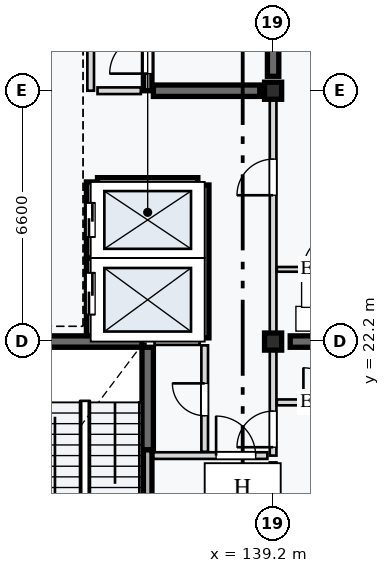
"""IFC4 building model, lengths in metres.
Left out: names, types, materials, properties, quantities, classifications, styles, units other than length and angle.
Written with IfcOpenShell. Run it as: python <this file> out.ifc"""

import sys

from ifc_helpers import new_model, si_unit, direction, frame, frame_2d, origin, origin_2d, place, context, subcontext, project, spatial, rectangle, extrude, element, fill, save


model = new_model("IFC4")
c1 = context("Model", 3, precision=1e-05, world=origin(), true_north=direction((0.0, 1.0)))
c2 = subcontext(c1, "Body", "Model", "MODEL_VIEW")
j1 = project(units=[si_unit("LENGTHUNIT", "METRE"), si_unit("PLANEANGLEUNIT", "RADIAN")], contexts=[c1])
p1 = place(None, origin())
s1 = spatial("IfcSite", under=j1, at=p1, CompositionType="ELEMENT")
p2 = place(p1, origin())
s2 = spatial("IfcBuilding", under=s1, at=p2, CompositionType="ELEMENT")
p3 = place(p2, frame((0.0, 0.0, 27.6)))
s3 = spatial("IfcBuildingStorey", under=s2, at=p3, CompositionType="ELEMENT", Elevation=27.6)
for number, where, z_axis, x_axis in (
    (1, (139.2, 22.2, 0.0), (0.0, 0.0, 1.0), (1.0, 0.0, 0.0)),
    (2, (139.2, 28.8, 0.0), (0.0, 0.0, 1.0), (1.0, 0.0, 0.0)),
):
    element("IfcColumn", number, at=place(p3, frame(where, z_axis=z_axis, x_axis=x_axis)), inside=s3, PredefinedType="COLUMN", context=c2, shape_type="SweptSolid", body=[
        extrude(rectangle(XDim=0.45, YDim=0.45, at=origin_2d()), origin(), (0.0, 0.0, 1.0), 3.2),
    ])
p4 = place(p3, frame((135.9, 19.35, 0.0), z_axis=(0.0, 0.0, 1.0), x_axis=(0.0, 1.0, 0.0)))
e3 = element("IfcWall", 3, at=p4, inside=s3, PredefinedType="SHEAR", context=c2, shape_type="SweptSolid", body=[
    extrude(rectangle(XDim=2.7, YDim=0.3, at=frame_2d((1.35, 0.0))), origin(), (0.0, 0.0, 1.0), 2.97),
])
p5 = place(p3, frame((132.95, 22.2, 0.0), z_axis=(0.0, 0.0, 1.0), x_axis=(1.0, 0.0, 0.0)))
e4 = element("IfcWall", 4, at=p5, inside=s3, PredefinedType="SHEAR", context=c2, shape_type="SweptSolid", body=[
    extrude(rectangle(XDim=2.8, YDim=0.3, at=frame_2d((1.4, 0.0))), origin(), (0.0, 0.0, 1.0), 2.97),
])
p6 = place(p3, frame((139.2, 29.18, 0.0), z_axis=(0.0, 0.0, 1.0), x_axis=(0.0, 1.0, 0.0)))
e5 = element("IfcWall", 5, at=p6, inside=s3, PredefinedType="SHEAR", context=c2, shape_type="SweptSolid", body=[
    extrude(rectangle(XDim=5.84, YDim=0.3, at=frame_2d((2.92, 0.0))), origin(), (0.0, 0.0, 1.0), 2.97),
])
p7 = place(p3, frame((136.05, 28.8, 0.0), z_axis=(0.0, 0.0, 1.0), x_axis=(1.0, 0.0, 0.0)))
e6 = element("IfcWall", 6, at=p7, inside=s3, PredefinedType="SHEAR", context=c2, shape_type="SweptSolid", body=[
    extrude(rectangle(XDim=2.8, YDim=0.3, at=frame_2d((1.4, 0.0))), origin(), (0.0, 0.0, 1.0), 2.97),
])
p8 = place(p3, frame((139.65, 22.2, 0.0), z_axis=(0.0, 0.0, 1.0), x_axis=(1.0, 0.0, 0.0)))
e7 = element("IfcWall", 7, at=p8, inside=s3, PredefinedType="SHEAR", context=c2, shape_type="SweptSolid", body=[
    extrude(rectangle(XDim=5.7, YDim=0.3, at=frame_2d((2.85, 0.0))), origin(), (0.0, 0.0, 1.0), 2.97),
])
p9 = place(p3, frame((135.9, 15.75, 0.0), z_axis=(0.0, 0.0, 1.0), x_axis=(0.0, 1.0, 0.0)))
e8 = element("IfcWall", 8, at=p9, inside=s3, PredefinedType="STANDARD", context=c2, shape_type="SweptSolid", body=[
    extrude(rectangle(XDim=3.6, YDim=0.225, at=frame_2d((1.8, 0.0))), origin(), (0.0, 0.0, 1.0), 2.97),
])
p10 = place(p9, frame((0.45, 0.0, 0.0)))
e9 = element("IfcOpeningElement", 9, at=p10, cuts=e8, PredefinedType="OPENING", context=c2, shape_type="SweptSolid", body=[
    extrude(rectangle(XDim=1.0, YDim=2.16, at=frame_2d((0.5, 1.08))), frame((0.0, 0.123, 0.0), z_axis=(0.0, -1.0, 0.0), x_axis=(1.0, 0.0, 0.0)), (0.0, 0.0, 1.0), 0.245),
])
p11 = place(p3, frame((136.05, 19.2, 0.0), z_axis=(0.0, 0.0, 1.0), x_axis=(1.0, 0.0, 0.0)))
e10 = element("IfcWall", 10, at=p11, inside=s3, PredefinedType="PARTITIONING", context=c2, shape_type="SweptSolid", body=[
    extrude(rectangle(XDim=3.0, YDim=0.175, at=frame_2d((1.5, 0.0))), origin(), (0.0, 0.0, 1.0), 2.97),
])
p12 = place(p11, frame((1.65, 0.0, 0.0)))
e11 = element("IfcOpeningElement", 11, at=p12, cuts=e10, PredefinedType="OPENING", context=c2, shape_type="SweptSolid", body=[
    extrude(rectangle(XDim=1.04, YDim=2.12, at=frame_2d((0.52, 1.06))), frame((0.0, 0.097, 0.0), z_axis=(0.0, -1.0, 0.0), x_axis=(1.0, 0.0, 0.0)), (0.0, 0.0, 1.0), 0.195),
])
p13 = place(p3, frame((137.4, 19.3, 0.0), z_axis=(0.0, 0.0, 1.0), x_axis=(0.0, 1.0, 0.0)))
e12 = element("IfcWall", 12, at=p13, inside=s3, PredefinedType="PARTITIONING", context=c2, shape_type="SweptSolid", body=[
    extrude(rectangle(XDim=2.8, YDim=0.175, at=frame_2d((1.4, 0.0))), origin(), (0.0, 0.0, 1.0), 2.97),
])
p14 = place(p13, frame((0.95, 0.0, 0.0)))
e13 = element("IfcOpeningElement", 13, at=p14, cuts=e12, PredefinedType="OPENING", context=c2, shape_type="SweptSolid", body=[
    extrude(rectangle(XDim=0.85, YDim=2.0, at=frame_2d((0.425, 1.0))), frame((0.0, 0.097, 0.0), z_axis=(0.0, -1.0, 0.0), x_axis=(1.0, 0.0, 0.0)), (0.0, 0.0, 1.0), 0.195),
])
p15 = place(p3, frame((136.08, 22.2, 0.0), z_axis=(0.0, 0.0, 1.0), x_axis=(1.0, 0.0, 0.0)))
e14 = element("IfcWall", 14, at=p15, inside=s3, PredefinedType="PARTITIONING", context=c2, shape_type="SweptSolid", body=[
    extrude(rectangle(XDim=1.19, YDim=0.175, at=frame_2d((0.595, 0.0))), origin(), (0.0, 0.0, 1.0), 2.97),
])
p16 = place(p3, frame((134.4, 22.36, 0.0), z_axis=(0.0, 0.0, 1.0), x_axis=(0.0, 1.0, 0.0)))
e15 = element("IfcWall", 15, at=p16, inside=s3, PredefinedType="STANDARD", context=c2, shape_type="SweptSolid", body=[
    extrude(rectangle(XDim=2.04, YDim=0.225, at=frame_2d((1.02, 0.0))), origin(), (0.0, 0.0, 1.0), 2.97),
])
p17 = place(p16, frame((0.55, 0.0, 0.0)))
e16 = element("IfcOpeningElement", 16, at=p17, cuts=e15, PredefinedType="OPENING", context=c2, shape_type="SweptSolid", body=[
    extrude(rectangle(XDim=1.1, YDim=2.1, at=frame_2d((0.55, 1.05))), frame((0.0, 0.123, 0.0), z_axis=(0.0, -1.0, 0.0), x_axis=(1.0, 0.0, 0.0)), (0.0, 0.0, 1.0), 0.245),
])
p18 = place(p3, frame((134.4, 24.4, 0.0), z_axis=(0.0, 0.0, 1.0), x_axis=(0.0, 1.0, 0.0)))
e17 = element("IfcWall", 17, at=p18, inside=s3, PredefinedType="STANDARD", context=c2, shape_type="SweptSolid", body=[
    extrude(rectangle(XDim=2.0, YDim=0.225, at=frame_2d((1.0, 0.0))), origin(), (0.0, 0.0, 1.0), 2.97),
])
p19 = place(p18, frame((0.55, 0.0, 0.0)))
e18 = element("IfcOpeningElement", 18, at=p19, cuts=e17, PredefinedType="OPENING", context=c2, shape_type="SweptSolid", body=[
    extrude(rectangle(XDim=0.9, YDim=2.1, at=frame_2d((0.45, 1.05))), frame((0.0, 0.123, 0.0), z_axis=(0.0, -1.0, 0.0), x_axis=(1.0, 0.0, 0.0)), (0.0, 0.0, 1.0), 0.245),
])
p20 = place(p3, frame((137.4, 22.298, 0.0), z_axis=(0.0, 0.0, 1.0), x_axis=(0.0, 1.0, 0.0)))
e19 = element("IfcWall", 19, at=p20, inside=s3, PredefinedType="STANDARD", context=c2, shape_type="SweptSolid", body=[
    extrude(rectangle(XDim=4.022, YDim=0.225, at=frame_2d((2.011, 0.0))), origin(), (0.0, 0.0, 1.0), 2.97),
])
for number, where, z_axis, x_axis in (
    (20, (134.58, 24.4, 0.0), (0.0, 0.0, 1.0), (1.0, 0.0, 0.0)),
    (21, (134.58, 26.4, 0.0), (0.0, 0.0, 1.0), (1.0, 0.0, 0.0)),
):
    element("IfcWall", number, at=place(p3, frame(where, z_axis=z_axis, x_axis=x_axis)), inside=s3, PredefinedType="STANDARD", context=c2, shape_type="SweptSolid", body=[
        extrude(rectangle(XDim=2.64, YDim=0.225, at=frame_2d((1.32, 0.0))), origin(), (0.0, 0.0, 1.0), 2.97),
    ])
p21 = place(p3, frame((135.9, 28.8, 0.0), z_axis=(0.0, 0.0, 1.0), x_axis=(0.0, 1.0, 0.0)))
e22 = element("IfcWall", 22, at=p21, inside=s3, PredefinedType="STANDARD", context=c2, shape_type="SweptSolid", body=[
    extrude(rectangle(XDim=3.45, YDim=0.225, at=frame_2d((1.725, 0.0))), origin(), (0.0, 0.0, 1.0), 2.97),
])
p22 = place(p21, frame((0.45, 0.0, 0.0)))
e23 = element("IfcOpeningElement", 23, at=p22, cuts=e22, PredefinedType="OPENING", context=c2, shape_type="SweptSolid", body=[
    extrude(rectangle(XDim=1.0, YDim=2.1, at=frame_2d((0.5, 1.05))), frame((0.0, 0.123, 0.0), z_axis=(0.0, -1.0, 0.0), x_axis=(1.0, 0.0, 0.0)), (0.0, 0.0, 1.0), 0.245),
])
p23 = place(p3, frame((134.4, 28.8, 0.0), z_axis=(0.0, 0.0, 1.0), x_axis=(0.0, 1.0, 0.0)))
e24 = element("IfcWall", 24, at=p23, inside=s3, PredefinedType="PARTITIONING", context=c2, shape_type="SweptSolid", body=[
    extrude(rectangle(XDim=3.3, YDim=0.175, at=frame_2d((1.65, 0.0))), origin(), (0.0, 0.0, 1.0), 2.97),
])
p24 = place(p23, frame((1.8, 0.0, 0.0)))
e25 = element("IfcOpeningElement", 25, at=p24, cuts=e24, PredefinedType="OPENING", context=c2, shape_type="SweptSolid", body=[
    extrude(rectangle(XDim=1.0, YDim=2.16, at=frame_2d((0.5, 1.08))), frame((0.0, 0.097, 0.0), z_axis=(0.0, -1.0, 0.0), x_axis=(1.0, 0.0, 0.0)), (0.0, 0.0, 1.0), 0.195),
])
p25 = place(p3, frame((134.58, 28.8, 0.0), z_axis=(0.0, 0.0, 1.0), x_axis=(1.0, 0.0, 0.0)))
e26 = element("IfcWall", 26, at=p25, inside=s3, PredefinedType="PARTITIONING", context=c2, shape_type="SweptSolid", body=[
    extrude(rectangle(XDim=1.14, YDim=0.175, at=frame_2d((0.57, 0.0))), origin(), (0.0, 0.0, 1.0), 2.97),
])
p26 = place(p3, frame((139.2, 15.88, 0.0), z_axis=(0.0, 0.0, 1.0), x_axis=(0.0, 1.0, 0.0)))
e27 = element("IfcWall", 27, at=p26, inside=s3, PredefinedType="PARTITIONING", context=c2, shape_type="SweptSolid", body=[
    extrude(rectangle(XDim=3.14, YDim=0.175, at=frame_2d((1.57, 0.0))), origin(), (0.0, 0.0, 1.0), 2.55),
])
p27 = place(p3, frame((139.2, 19.2, 0.0), z_axis=(0.0, 0.0, 1.0), x_axis=(0.0, 1.0, 0.0)))
e28 = element("IfcWall", 28, at=p27, inside=s3, PredefinedType="PARTITIONING", context=c2, shape_type="SweptSolid", body=[
    extrude(rectangle(XDim=3.0, YDim=0.175, at=frame_2d((1.5, 0.0))), origin(), (0.0, 0.0, 1.0), 2.55),
])
p28 = place(p27, frame((0.22, 0.0, 0.0)))
e29 = element("IfcOpeningElement", 29, at=p28, cuts=e28, PredefinedType="OPENING", context=c2, shape_type="SweptSolid", body=[
    extrude(rectangle(XDim=0.95, YDim=2.1, at=frame_2d((0.475, 1.05))), frame((0.0, 0.097, 0.0), z_axis=(0.0, -1.0, 0.0), x_axis=(1.0, 0.0, 0.0)), (0.0, 0.0, 1.0), 0.195),
])
p29 = place(p3, frame((139.298, 20.6, 0.0), z_axis=(0.0, 0.0, 1.0), x_axis=(1.0, 0.0, 0.0)))
e30 = element("IfcWall", 30, at=p29, inside=s3, PredefinedType="PARTITIONING", context=c2, shape_type="SweptSolid", body=[
    extrude(rectangle(XDim=2.302, YDim=0.155, at=frame_2d((1.151, 0.0))), origin(), (0.0, 0.0, 1.0), 2.97),
])
p30 = place(p29, frame((0.7, 0.0, 0.0)))
e31 = element("IfcOpeningElement", 31, at=p30, cuts=e30, PredefinedType="OPENING", context=c2, shape_type="SweptSolid", body=[
    extrude(rectangle(XDim=0.91, YDim=2.14, at=frame_2d((0.455, 1.07))), frame((0.0, 0.087, 0.0), z_axis=(0.0, -1.0, 0.0), x_axis=(1.0, 0.0, 0.0)), (0.0, 0.0, 1.0), 0.175),
])
p31 = place(p3, frame((139.2, 22.2, 0.0), z_axis=(0.0, 0.0, 1.0), x_axis=(0.0, 1.0, 0.0)))
e32 = element("IfcWall", 32, at=p31, inside=s3, PredefinedType="PARTITIONING", context=c2, shape_type="SweptSolid", body=[
    extrude(rectangle(XDim=6.6, YDim=0.175, at=frame_2d((3.3, 0.0))), origin(), (0.0, 0.0, 1.0), 2.55),
])
p32 = place(p31, frame((3.85, 0.0, 0.0)))
e33 = element("IfcOpeningElement", 33, at=p32, cuts=e32, PredefinedType="OPENING", context=c2, shape_type="SweptSolid", body=[
    extrude(rectangle(XDim=0.95, YDim=2.1, at=frame_2d((0.475, 1.05))), frame((0.0, 0.097, 0.0), z_axis=(0.0, -1.0, 0.0), x_axis=(1.0, 0.0, 0.0)), (0.0, 0.0, 1.0), 0.195),
])
p33 = place(p3, frame((139.298, 24.1, 0.0), z_axis=(0.0, 0.0, 1.0), x_axis=(1.0, 0.0, 0.0)))
e34 = element("IfcWall", 34, at=p33, inside=s3, PredefinedType="PARTITIONING", context=c2, shape_type="SweptSolid", body=[
    extrude(rectangle(XDim=2.302, YDim=0.125, at=frame_2d((1.151, 0.0))), origin(), (0.0, 0.0, 1.0), 2.97),
])
p34 = place(p33, frame((0.7, 0.0, 0.0)))
e35 = element("IfcOpeningElement", 35, at=p34, cuts=e34, PredefinedType="OPENING", context=c2, shape_type="SweptSolid", body=[
    extrude(rectangle(XDim=0.94, YDim=2.08, at=frame_2d((0.47, 1.04))), frame((0.0, 0.073, 0.0), z_axis=(0.0, -1.0, 0.0), x_axis=(1.0, 0.0, 0.0)), (0.0, 0.0, 1.0), 0.145),
])
p35 = place(p12, origin())
e36 = element("IfcDoor", 36, at=p35, inside=s3, OperationType="SINGLE_SWING_LEFT", PredefinedType="DOOR", context=c2, shape_type="SweptSolid", body=[
    extrude(rectangle(XDim=1.04, YDim=2.12, at=frame_2d((0.52, 1.06))), frame((0.0, 0.025, 0.0), z_axis=(0.0, -1.0, 0.0), x_axis=(1.0, 0.0, 0.0)), (0.0, 0.0, 1.0), 0.05),
])
fill(e11, e36)
p36 = place(p14, origin())
e37 = element("IfcDoor", 37, at=p36, inside=s3, OperationType="SINGLE_SWING_RIGHT", PredefinedType="DOOR", context=c2, shape_type="SweptSolid", body=[
    extrude(rectangle(XDim=0.85, YDim=2.0, at=frame_2d((0.425, 1.0))), frame((0.0, 0.025, 0.0), z_axis=(0.0, -1.0, 0.0), x_axis=(1.0, 0.0, 0.0)), (0.0, 0.0, 1.0), 0.05),
])
fill(e13, e37)
p37 = place(p17, origin())
e38 = element("IfcDoor", 38, at=p37, inside=s3, OperationType="DOUBLE_DOOR_SLIDING", PredefinedType="DOOR", context=c2, shape_type="SweptSolid", body=[
    extrude(rectangle(XDim=1.1, YDim=2.1, at=frame_2d((0.55, 1.05))), frame((0.0, 0.025, 0.0), z_axis=(0.0, -1.0, 0.0), x_axis=(1.0, 0.0, 0.0)), (0.0, 0.0, 1.0), 0.05),
])
fill(e16, e38)
p38 = place(p19, origin())
e39 = element("IfcDoor", 39, at=p38, inside=s3, OperationType="DOUBLE_DOOR_SLIDING", PredefinedType="DOOR", context=c2, shape_type="SweptSolid", body=[
    extrude(rectangle(XDim=0.9, YDim=2.1, at=frame_2d((0.45, 1.05))), frame((0.0, 0.025, 0.0), z_axis=(0.0, -1.0, 0.0), x_axis=(1.0, 0.0, 0.0)), (0.0, 0.0, 1.0), 0.05),
])
fill(e18, e39)
p39 = place(p22, origin())
e40 = element("IfcDoor", 40, at=p39, inside=s3, OperationType="SINGLE_SWING_LEFT", PredefinedType="DOOR", context=c2, shape_type="SweptSolid", body=[
    extrude(rectangle(XDim=1.0, YDim=2.1, at=frame_2d((0.5, 1.05))), frame((0.0, 0.025, 0.0), z_axis=(0.0, -1.0, 0.0), x_axis=(1.0, 0.0, 0.0)), (0.0, 0.0, 1.0), 0.05),
])
fill(e23, e40)
p40 = place(p28, origin())
e41 = element("IfcDoor", 41, at=p40, inside=s3, OperationType="SINGLE_SWING_LEFT", PredefinedType="DOOR", context=c2, shape_type="SweptSolid", body=[
    extrude(rectangle(XDim=0.95, YDim=2.1, at=frame_2d((0.475, 1.05))), frame((0.0, 0.025, 0.0), z_axis=(0.0, -1.0, 0.0), x_axis=(1.0, 0.0, 0.0)), (0.0, 0.0, 1.0), 0.05),
])
fill(e29, e41)
p41 = place(p30, origin())
e42 = element("IfcDoor", 42, at=p41, inside=s3, OperationType="SINGLE_SWING_LEFT", PredefinedType="DOOR", context=c2, shape_type="SweptSolid", body=[
    extrude(rectangle(XDim=0.91, YDim=2.14, at=frame_2d((0.455, 1.07))), frame((0.0, 0.025, 0.0), z_axis=(0.0, -1.0, 0.0), x_axis=(1.0, 0.0, 0.0)), (0.0, 0.0, 1.0), 0.05),
])
fill(e31, e42)
p42 = place(p32, origin())
e43 = element("IfcDoor", 43, at=p42, inside=s3, OperationType="SINGLE_SWING_LEFT", PredefinedType="DOOR", context=c2, shape_type="SweptSolid", body=[
    extrude(rectangle(XDim=0.95, YDim=2.1, at=frame_2d((0.475, 1.05))), frame((0.0, 0.025, 0.0), z_axis=(0.0, -1.0, 0.0), x_axis=(1.0, 0.0, 0.0)), (0.0, 0.0, 1.0), 0.05),
])
fill(e33, e43)
p43 = place(p34, origin())
e44 = element("IfcDoor", 44, at=p43, inside=s3, OperationType="SINGLE_SWING_RIGHT", PredefinedType="DOOR", context=c2, shape_type="SweptSolid", body=[
    extrude(rectangle(XDim=0.94, YDim=2.08, at=frame_2d((0.47, 1.04))), frame((0.0, 0.025, 0.0), z_axis=(0.0, -1.0, 0.0), x_axis=(1.0, 0.0, 0.0)), (0.0, 0.0, 1.0), 0.05),
])
fill(e35, e44)
save(model, sys.argv[1])
